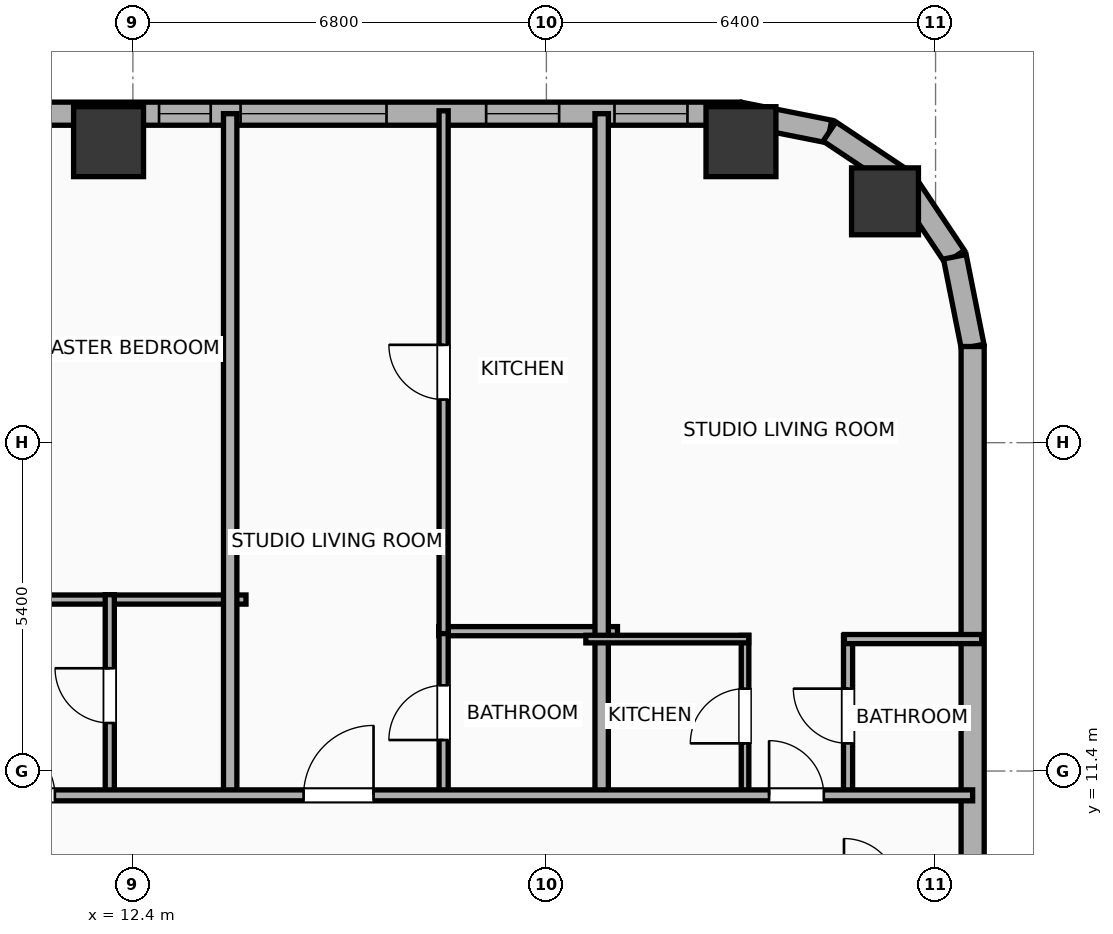
"""IFC4 building model, lengths in metres.
Left out: names, types, materials, properties, quantities, classifications, styles, units other than length and angle.
Written with IfcOpenShell. Run it as: python <this file> out.ifc"""

import sys

from ifc_helpers import new_model, si_unit, direction, frame, frame_2d, origin, origin_2d, place, context, subcontext, project, spatial, rectangle, hollow_rectangle, hollow_circle, extrude, element, fill, save


model = new_model("IFC4")
c1 = context("Model", 3, precision=1e-05, world=origin(), true_north=direction((0.0, 1.0)))
c2 = subcontext(c1, "Body", "Model", "MODEL_VIEW")
j1 = project(units=[si_unit("LENGTHUNIT", "METRE"), si_unit("PLANEANGLEUNIT", "RADIAN")], contexts=[c1])
p1 = place(None, origin())
s1 = spatial("IfcSite", under=j1, at=p1, CompositionType="ELEMENT")
p2 = place(p1, origin())
s2 = spatial("IfcBuilding", under=s1, at=p2, CompositionType="ELEMENT")
p3 = place(p2, frame((0.0, 0.0, 65.0)))
s3 = spatial("IfcBuildingStorey", under=s2, at=p3, CompositionType="ELEMENT", Elevation=65.0)
p4 = place(p3, frame((24.769, 20.769, 0.0), z_axis=(0.0, 0.0, 1.0), x_axis=(1.0, 0.0, 0.0)))
e1 = element("IfcColumn", 1, at=p4, inside=s3, PredefinedType="COLUMN", context=c2, shape_type="SweptSolid", body=[
    extrude(hollow_circle(Radius=0.55, WallThickness=0.036, at=origin_2d()), origin(), (0.0, 0.0, 1.0), 3.9),
])
for number, where, z_axis, x_axis in (
    (2, (22.4, 21.75, 0.0), (0.0, 0.0, 1.0), (1.0, 0.0, 0.0)),
    (3, (12.0, 21.75, 0.0), (0.0, 0.0, 1.0), (1.0, 0.0, 0.0)),
):
    element("IfcColumn", number, at=place(p3, frame(where, z_axis=z_axis, x_axis=x_axis)), inside=s3, PredefinedType="COLUMN", context=c2, shape_type="SweptSolid", body=[
        extrude(hollow_rectangle(XDim=1.15, YDim=1.15, WallThickness=0.04, at=origin_2d()), origin(), (0.0, 0.0, 1.0), 3.9),
    ])
p5 = place(p3, frame((-29.581, 22.21, 0.0), z_axis=(0.0, 0.0, 1.0), x_axis=(1.0, 0.0, 0.0)))
e4 = element("IfcWall", 4, at=p5, inside=s3, PredefinedType="ELEMENTEDWALL", context=c2, shape_type="SweptSolid", body=[
    extrude(rectangle(XDim=51.963, YDim=0.38, at=frame_2d((25.981, 0.0))), origin(), (0.0, 0.0, 1.0), 3.65),
])
p6 = place(p5, frame((5.81, 0.0, 0.75)))
e5 = element("IfcOpeningElement", 5, at=p6, cuts=e4, PredefinedType="OPENING", context=c2, shape_type="SweptSolid", body=[
    extrude(rectangle(XDim=2.4, YDim=2.1, at=frame_2d((1.2, 1.05))), frame((0.0, 0.2, 0.0), z_axis=(0.0, -1.0, 0.0), x_axis=(1.0, 0.0, 0.0)), (0.0, 0.0, 1.0), 0.4),
])
p7 = place(p5, frame((26.431, 0.0, 0.75)))
e6 = element("IfcOpeningElement", 6, at=p7, cuts=e4, PredefinedType="OPENING", context=c2, shape_type="SweptSolid", body=[
    extrude(rectangle(XDim=2.4, YDim=2.1, at=frame_2d((1.2, 1.05))), frame((0.0, 0.2, 0.0), z_axis=(0.0, -1.0, 0.0), x_axis=(1.0, 0.0, 0.0)), (0.0, 0.0, 1.0), 0.4),
])
p8 = place(p5, frame((43.752, 0.0, 0.75)))
e7 = element("IfcOpeningElement", 7, at=p8, cuts=e4, PredefinedType="OPENING", context=c2, shape_type="SweptSolid", body=[
    extrude(rectangle(XDim=2.4, YDim=2.1, at=frame_2d((1.2, 1.05))), frame((0.0, 0.2, 0.0), z_axis=(0.0, -1.0, 0.0), x_axis=(1.0, 0.0, 0.0)), (0.0, 0.0, 1.0), 0.4),
])
p9 = place(p5, frame((1.163, 0.0, 0.75)))
e8 = element("IfcOpeningElement", 8, at=p9, cuts=e4, PredefinedType="OPENING", context=c2, shape_type="SweptSolid", body=[
    extrude(rectangle(XDim=1.2, YDim=2.05, at=frame_2d((0.6, 1.025))), frame((0.0, 0.2, 0.0), z_axis=(0.0, -1.0, 0.0), x_axis=(1.0, 0.0, 0.0)), (0.0, 0.0, 1.0), 0.4),
])
p10 = place(p5, frame((3.251, 0.0, 0.75)))
e9 = element("IfcOpeningElement", 9, at=p10, cuts=e4, PredefinedType="OPENING", context=c2, shape_type="SweptSolid", body=[
    extrude(rectangle(XDim=1.2, YDim=2.05, at=frame_2d((0.6, 1.025))), frame((0.0, 0.2, 0.0), z_axis=(0.0, -1.0, 0.0), x_axis=(1.0, 0.0, 0.0)), (0.0, 0.0, 1.0), 0.4),
])
p11 = place(p5, frame((11.745, 0.0, 0.75)))
e10 = element("IfcOpeningElement", 10, at=p11, cuts=e4, PredefinedType="OPENING", context=c2, shape_type="SweptSolid", body=[
    extrude(rectangle(XDim=1.2, YDim=2.05, at=frame_2d((0.6, 1.025))), frame((0.0, 0.2, 0.0), z_axis=(0.0, -1.0, 0.0), x_axis=(1.0, 0.0, 0.0)), (0.0, 0.0, 1.0), 0.4),
])
p12 = place(p5, frame((16.776, 0.0, 0.75)))
e11 = element("IfcOpeningElement", 11, at=p12, cuts=e4, PredefinedType="OPENING", context=c2, shape_type="SweptSolid", body=[
    extrude(rectangle(XDim=1.2, YDim=2.05, at=frame_2d((0.6, 1.025))), frame((0.0, 0.2, 0.0), z_axis=(0.0, -1.0, 0.0), x_axis=(1.0, 0.0, 0.0)), (0.0, 0.0, 1.0), 0.4),
])
p13 = place(p5, frame((21.531, 0.0, 0.75)))
e12 = element("IfcOpeningElement", 12, at=p13, cuts=e4, PredefinedType="OPENING", context=c2, shape_type="SweptSolid", body=[
    extrude(rectangle(XDim=0.85, YDim=2.05, at=frame_2d((0.425, 1.025))), frame((0.0, 0.2, 0.0), z_axis=(0.0, -1.0, 0.0), x_axis=(1.0, 0.0, 0.0)), (0.0, 0.0, 1.0), 0.4),
])
p14 = place(p5, frame((23.776, 0.0, 0.75)))
e13 = element("IfcOpeningElement", 13, at=p14, cuts=e4, PredefinedType="OPENING", context=c2, shape_type="SweptSolid", body=[
    extrude(rectangle(XDim=1.2, YDim=2.05, at=frame_2d((0.6, 1.025))), frame((0.0, 0.2, 0.0), z_axis=(0.0, -1.0, 0.0), x_axis=(1.0, 0.0, 0.0)), (0.0, 0.0, 1.0), 0.4),
])
p15 = place(p5, frame((32.031, 0.0, 0.75)))
e14 = element("IfcOpeningElement", 14, at=p15, cuts=e4, PredefinedType="OPENING", context=c2, shape_type="SweptSolid", body=[
    extrude(rectangle(XDim=0.85, YDim=2.05, at=frame_2d((0.425, 1.025))), frame((0.0, 0.2, 0.0), z_axis=(0.0, -1.0, 0.0), x_axis=(1.0, 0.0, 0.0)), (0.0, 0.0, 1.0), 0.4),
])
p16 = place(p5, frame((34.276, 0.0, 0.75)))
e15 = element("IfcOpeningElement", 15, at=p16, cuts=e4, PredefinedType="OPENING", context=c2, shape_type="SweptSolid", body=[
    extrude(rectangle(XDim=1.2, YDim=2.05, at=frame_2d((0.6, 1.025))), frame((0.0, 0.2, 0.0), z_axis=(0.0, -1.0, 0.0), x_axis=(1.0, 0.0, 0.0)), (0.0, 0.0, 1.0), 0.4),
])
p17 = place(p5, frame((37.776, 0.0, 0.75)))
e16 = element("IfcOpeningElement", 16, at=p17, cuts=e4, PredefinedType="OPENING", context=c2, shape_type="SweptSolid", body=[
    extrude(rectangle(XDim=1.2, YDim=2.05, at=frame_2d((0.6, 1.025))), frame((0.0, 0.2, 0.0), z_axis=(0.0, -1.0, 0.0), x_axis=(1.0, 0.0, 0.0)), (0.0, 0.0, 1.0), 0.4),
])
p18 = place(p5, frame((42.411, 0.0, 0.75)))
e17 = element("IfcOpeningElement", 17, at=p18, cuts=e4, PredefinedType="OPENING", context=c2, shape_type="SweptSolid", body=[
    extrude(rectangle(XDim=0.85, YDim=2.05, at=frame_2d((0.425, 1.025))), frame((0.0, 0.2, 0.0), z_axis=(0.0, -1.0, 0.0), x_axis=(1.0, 0.0, 0.0)), (0.0, 0.0, 1.0), 0.4),
])
p19 = place(p5, frame((47.791, 0.0, 0.75)))
e18 = element("IfcOpeningElement", 18, at=p19, cuts=e4, PredefinedType="OPENING", context=c2, shape_type="SweptSolid", body=[
    extrude(rectangle(XDim=1.2, YDim=2.05, at=frame_2d((0.6, 1.025))), frame((0.0, 0.2, 0.0), z_axis=(0.0, -1.0, 0.0), x_axis=(1.0, 0.0, 0.0)), (0.0, 0.0, 1.0), 0.4),
])
p20 = place(p5, frame((49.901, 0.0, 0.75)))
e19 = element("IfcOpeningElement", 19, at=p20, cuts=e4, PredefinedType="OPENING", context=c2, shape_type="SweptSolid", body=[
    extrude(rectangle(XDim=1.2, YDim=2.05, at=frame_2d((0.6, 1.025))), frame((0.0, 0.2, 0.0), z_axis=(0.0, -1.0, 0.0), x_axis=(1.0, 0.0, 0.0)), (0.0, 0.0, 1.0), 0.4),
])
p21 = place(p3, frame((22.381, 22.21, 0.0), z_axis=(0.0, 0.0, 1.0), x_axis=(0.980786132421, -0.195086038585, 0.0)))
e20 = element("IfcWall", 20, at=p21, inside=s3, PredefinedType="ELEMENTEDWALL", context=c2, shape_type="SweptSolid", body=[
    extrude(rectangle(XDim=1.504, YDim=0.38, at=frame_2d((0.752, 0.0))), origin(), (0.0, 0.0, 1.0), 3.65),
])
for number, where, z_axis, x_axis in (
    (21, (23.857, 21.917, 0.0), (0.0, 0.0, 1.0), (0.831, -0.556, 0.0)),
    (22, (25.091, 21.091, 0.0), (0.0, 0.0, 1.0), (0.556, -0.831, 0.0)),
):
    element("IfcWall", number, at=place(p3, frame(where, z_axis=z_axis, x_axis=x_axis)), inside=s3, PredefinedType="ELEMENTEDWALL", context=c2, shape_type="SweptSolid", body=[
        extrude(rectangle(XDim=1.485, YDim=0.38, at=frame_2d((0.743, 0.0))), origin(), (0.0, 0.0, 1.0), 3.65),
    ])
p22 = place(p3, frame((25.917, 19.857, 0.0), z_axis=(0.0, 0.0, 1.0), x_axis=(0.195086038585, -0.980786132421, 0.0)))
e23 = element("IfcWall", 23, at=p22, inside=s3, PredefinedType="ELEMENTEDWALL", context=c2, shape_type="SweptSolid", body=[
    extrude(rectangle(XDim=1.504, YDim=0.38, at=frame_2d((0.752, 0.0))), origin(), (0.0, 0.0, 1.0), 3.65),
])
p23 = place(p3, frame((26.21, 18.381, 0.0), z_axis=(0.0, 0.0, 1.0), x_axis=(0.0, -1.0, 0.0)))
e24 = element("IfcWall", 24, at=p23, inside=s3, PredefinedType="ELEMENTEDWALL", context=c2, shape_type="SweptSolid", body=[
    extrude(rectangle(XDim=36.763, YDim=0.38, at=frame_2d((18.381, 0.0))), origin(), (0.0, 0.0, 1.0), 3.65),
])
p24 = place(p3, frame((10.47, 14.22, 0.0), z_axis=(0.0, 0.0, 1.0), x_axis=(1.0, 0.0, 0.0)))
e25 = element("IfcWall", 25, at=p24, inside=s3, PredefinedType="PLUMBINGWALL", context=c2, shape_type="SweptSolid", body=[
    extrude(rectangle(XDim=3.79, YDim=0.15, at=frame_2d((1.895, 0.0))), origin(), (0.0, 0.0, 1.0), 3.65),
])
p25 = place(p3, frame((12.02, 10.98, 0.0), z_axis=(0.0, 0.0, 1.0), x_axis=(0.0, 1.0, 0.0)))
e26 = element("IfcWall", 26, at=p25, inside=s3, PredefinedType="PLUMBINGWALL", context=c2, shape_type="SweptSolid", body=[
    extrude(rectangle(XDim=3.32, YDim=0.15, at=frame_2d((1.66, 0.0))), origin(), (0.0, 0.0, 1.0), 2.94),
])
p26 = place(p25, frame((1.21, 0.0, 0.0)))
e27 = element("IfcOpeningElement", 27, at=p26, cuts=e26, PredefinedType="OPENING", context=c2, shape_type="SweptSolid", body=[
    extrude(rectangle(XDim=0.9, YDim=2.05, at=frame_2d((0.45, 1.025))), frame((0.0, 0.085, 0.0), z_axis=(0.0, -1.0, 0.0), x_axis=(1.0, 0.0, 0.0)), (0.0, 0.0, 1.0), 0.17),
])
p27 = place(p3, frame((14.0, 10.92, 0.0), z_axis=(0.0, 0.0, 1.0), x_axis=(0.0, 1.0, 0.0)))
e28 = element("IfcWall", 28, at=p27, inside=s3, PredefinedType="PARTITIONING", context=c2, shape_type="SweptSolid", body=[
    extrude(rectangle(XDim=11.29, YDim=0.22, at=frame_2d((5.645, 0.0))), origin(), (0.0, 0.0, 1.0), 3.65),
])
p28 = place(p3, frame((17.43, 13.7, 0.0), z_axis=(0.0, 0.0, 1.0), x_axis=(1.0, 0.0, 0.0)))
e29 = element("IfcWall", 29, at=p28, inside=s3, PredefinedType="PLUMBINGWALL", context=c2, shape_type="SweptSolid", body=[
    extrude(rectangle(XDim=2.939, YDim=0.15, at=frame_2d((1.469, 0.0))), origin(), (0.0, 0.0, 1.0), 3.65),
])
p29 = place(p3, frame((17.51, 10.98, 0.0), z_axis=(0.0, 0.0, 1.0), x_axis=(0.0, 1.0, 0.0)))
e30 = element("IfcWall", 30, at=p29, inside=s3, PredefinedType="PLUMBINGWALL", context=c2, shape_type="SweptSolid", body=[
    extrude(rectangle(XDim=2.76, YDim=0.15, at=frame_2d((1.38, 0.0))), origin(), (0.0, 0.0, 1.0), 3.65),
])
p30 = place(p29, frame((0.93, 0.0, 0.0)))
e31 = element("IfcOpeningElement", 31, at=p30, cuts=e30, PredefinedType="OPENING", context=c2, shape_type="SweptSolid", body=[
    extrude(rectangle(XDim=0.9, YDim=2.05, at=frame_2d((0.45, 1.025))), frame((0.0, 0.085, 0.0), z_axis=(0.0, -1.0, 0.0), x_axis=(1.0, 0.0, 0.0)), (0.0, 0.0, 1.0), 0.17),
])
p31 = place(p3, frame((17.51, 13.66, 0.0), z_axis=(0.0, 0.0, 1.0), x_axis=(0.0, 1.0, 0.0)))
e32 = element("IfcWall", 32, at=p31, inside=s3, PredefinedType="PLUMBINGWALL", context=c2, shape_type="SweptSolid", body=[
    extrude(rectangle(XDim=8.598, YDim=0.15, at=frame_2d((4.299, 0.0))), origin(), (0.0, 0.0, 1.0), 3.65),
])
p32 = place(p31, frame((3.849, 0.0, 0.0)))
e33 = element("IfcOpeningElement", 33, at=p32, cuts=e32, PredefinedType="OPENING", context=c2, shape_type="SweptSolid", body=[
    extrude(rectangle(XDim=0.9, YDim=2.05, at=frame_2d((0.45, 1.025))), frame((0.0, 0.085, 0.0), z_axis=(0.0, -1.0, 0.0), x_axis=(1.0, 0.0, 0.0)), (0.0, 0.0, 1.0), 0.17),
])
p33 = place(p3, frame((20.109, 10.92, 0.0), z_axis=(0.0, 0.0, 1.0), x_axis=(0.0, 1.0, 0.0)))
e34 = element("IfcWall", 34, at=p33, inside=s3, PredefinedType="PARTITIONING", context=c2, shape_type="SweptSolid", body=[
    extrude(rectangle(XDim=11.29, YDim=0.22, at=frame_2d((5.645, 0.0))), origin(), (0.0, 0.0, 1.0), 3.65),
])
p34 = place(p3, frame((22.467, 10.98, 0.0), z_axis=(0.0, 0.0, 1.0), x_axis=(0.0, 1.0, 0.0)))
e35 = element("IfcWall", 35, at=p34, inside=s3, PredefinedType="PARTITIONING", context=c2, shape_type="SweptSolid", body=[
    extrude(rectangle(XDim=2.65, YDim=0.125, at=frame_2d((1.325, 0.0))), origin(), (0.0, 0.0, 1.0), 3.65),
])
p35 = place(p34, frame((0.875, 0.0, 0.0)))
e36 = element("IfcOpeningElement", 36, at=p35, cuts=e35, PredefinedType="OPENING", context=c2, shape_type="SweptSolid", body=[
    extrude(rectangle(XDim=0.9, YDim=2.05, at=frame_2d((0.45, 1.025))), frame((0.0, 0.073, 0.0), z_axis=(0.0, -1.0, 0.0), x_axis=(1.0, 0.0, 0.0)), (0.0, 0.0, 1.0), 0.145),
])
p36 = place(p3, frame((24.161, 10.98, 0.0), z_axis=(0.0, 0.0, 1.0), x_axis=(0.0, 1.0, 0.0)))
e37 = element("IfcWall", 37, at=p36, inside=s3, PredefinedType="PLUMBINGWALL", context=c2, shape_type="SweptSolid", body=[
    extrude(rectangle(XDim=2.65, YDim=0.15, at=frame_2d((1.325, 0.0))), origin(), (0.0, 0.0, 1.0), 3.65),
])
p37 = place(p36, frame((0.875, 0.0, 0.0)))
e38 = element("IfcOpeningElement", 38, at=p37, cuts=e37, PredefinedType="OPENING", context=c2, shape_type="SweptSolid", body=[
    extrude(rectangle(XDim=0.9, YDim=2.05, at=frame_2d((0.45, 1.025))), frame((0.0, 0.085, 0.0), z_axis=(0.0, -1.0, 0.0), x_axis=(1.0, 0.0, 0.0)), (0.0, 0.0, 1.0), 0.17),
])
p38 = place(p3, frame((19.849, 13.57, 0.0), z_axis=(0.0, 0.0, 1.0), x_axis=(1.0, 0.0, 0.0)))
e39 = element("IfcWall", 39, at=p38, inside=s3, PredefinedType="PARTITIONING", context=c2, shape_type="SweptSolid", body=[
    extrude(rectangle(XDim=2.678, YDim=0.125, at=frame_2d((1.339, 0.0))), origin(), (0.0, 0.0, 1.0), 3.65),
])
p39 = place(p3, frame((24.101, 13.57, 0.0), z_axis=(0.0, 0.0, 1.0), x_axis=(1.0, 0.0, 0.0)))
e40 = element("IfcWall", 40, at=p39, inside=s3, PredefinedType="PLUMBINGWALL", context=c2, shape_type="SweptSolid", body=[
    extrude(rectangle(XDim=2.259, YDim=0.15, at=frame_2d((1.129, 0.0))), origin(), (0.0, 0.0, 1.0), 3.65),
])
p40 = place(p3, frame((-33.41, 11.0, 0.0), z_axis=(0.0, 0.0, 1.0), x_axis=(1.0, 0.0, 0.0)))
e41 = element("IfcWall", 41, at=p40, inside=s3, PredefinedType="PARTITIONING", context=c2, shape_type="SweptSolid", body=[
    extrude(rectangle(XDim=59.62, YDim=0.18, at=frame_2d((29.81, 0.0))), origin(), (0.0, 0.0, 1.0), 3.65),
])
p41 = place(p40, frame((2.913, 0.0, 0.0)))
e42 = element("IfcOpeningElement", 42, at=p41, cuts=e41, PredefinedType="OPENING", context=c2, shape_type="SweptSolid", body=[
    extrude(rectangle(XDim=0.9, YDim=2.05, at=frame_2d((0.45, 1.025))), frame((0.0, 0.1, 0.0), z_axis=(0.0, -1.0, 0.0), x_axis=(1.0, 0.0, 0.0)), (0.0, 0.0, 1.0), 0.2),
])
p42 = place(p40, frame((10.312, 0.0, 0.0)))
e43 = element("IfcOpeningElement", 43, at=p42, cuts=e41, PredefinedType="OPENING", context=c2, shape_type="SweptSolid", body=[
    extrude(rectangle(XDim=1.15, YDim=2.05, at=frame_2d((0.575, 1.025))), frame((0.0, 0.1, 0.0), z_axis=(0.0, -1.0, 0.0), x_axis=(1.0, 0.0, 0.0)), (0.0, 0.0, 1.0), 0.2),
])
p43 = place(p40, frame((15.85, 0.0, 0.0)))
e44 = element("IfcOpeningElement", 44, at=p43, cuts=e41, PredefinedType="OPENING", context=c2, shape_type="SweptSolid", body=[
    extrude(rectangle(XDim=0.9, YDim=2.05, at=frame_2d((0.45, 1.025))), frame((0.0, 0.1, 0.0), z_axis=(0.0, -1.0, 0.0), x_axis=(1.0, 0.0, 0.0)), (0.0, 0.0, 1.0), 0.2),
])
p44 = place(p40, frame((22.623, 0.0, 0.0)))
e45 = element("IfcOpeningElement", 45, at=p44, cuts=e41, PredefinedType="OPENING", context=c2, shape_type="SweptSolid", body=[
    extrude(rectangle(XDim=0.9, YDim=2.05, at=frame_2d((0.45, 1.025))), frame((0.0, 0.1, 0.0), z_axis=(0.0, -1.0, 0.0), x_axis=(1.0, 0.0, 0.0)), (0.0, 0.0, 1.0), 0.2),
])
p45 = place(p40, frame((29.622, 0.0, 0.0)))
e46 = element("IfcOpeningElement", 46, at=p45, cuts=e41, PredefinedType="OPENING", context=c2, shape_type="SweptSolid", body=[
    extrude(rectangle(XDim=0.9, YDim=2.05, at=frame_2d((0.45, 1.025))), frame((0.0, 0.1, 0.0), z_axis=(0.0, -1.0, 0.0), x_axis=(1.0, 0.0, 0.0)), (0.0, 0.0, 1.0), 0.2),
])
p46 = place(p40, frame((36.628, 0.0, 0.0)))
e47 = element("IfcOpeningElement", 47, at=p46, cuts=e41, PredefinedType="OPENING", context=c2, shape_type="SweptSolid", body=[
    extrude(rectangle(XDim=0.9, YDim=2.05, at=frame_2d((0.45, 1.025))), frame((0.0, 0.1, 0.0), z_axis=(0.0, -1.0, 0.0), x_axis=(1.0, 0.0, 0.0)), (0.0, 0.0, 1.0), 0.2),
])
p47 = place(p40, frame((43.627, 0.0, 0.0)))
e48 = element("IfcOpeningElement", 48, at=p47, cuts=e41, PredefinedType="OPENING", context=c2, shape_type="SweptSolid", body=[
    extrude(rectangle(XDim=0.9, YDim=2.05, at=frame_2d((0.45, 1.025))), frame((0.0, 0.1, 0.0), z_axis=(0.0, -1.0, 0.0), x_axis=(1.0, 0.0, 0.0)), (0.0, 0.0, 1.0), 0.2),
])
p48 = place(p40, frame((48.617, 0.0, 0.0)))
e49 = element("IfcOpeningElement", 49, at=p48, cuts=e41, PredefinedType="OPENING", context=c2, shape_type="SweptSolid", body=[
    extrude(rectangle(XDim=1.15, YDim=2.05, at=frame_2d((0.575, 1.025))), frame((0.0, 0.1, 0.0), z_axis=(0.0, -1.0, 0.0), x_axis=(1.0, 0.0, 0.0)), (0.0, 0.0, 1.0), 0.2),
])
p49 = place(p40, frame((56.272, 0.0, 0.0)))
e50 = element("IfcOpeningElement", 50, at=p49, cuts=e41, PredefinedType="OPENING", context=c2, shape_type="SweptSolid", body=[
    extrude(rectangle(XDim=0.9, YDim=2.05, at=frame_2d((0.45, 1.025))), frame((0.0, 0.1, 0.0), z_axis=(0.0, -1.0, 0.0), x_axis=(1.0, 0.0, 0.0)), (0.0, 0.0, 1.0), 0.2),
])
p50 = place(p8, origin())
e51 = element("IfcWindow", 51, at=p50, inside=s3, PartitioningType="SINGLE_PANEL", PredefinedType="WINDOW", context=c2, shape_type="SweptSolid", body=[
    extrude(rectangle(XDim=2.4, YDim=2.1, at=frame_2d((1.2, 1.05))), frame((0.0, 0.03, 0.0), z_axis=(0.0, -1.0, 0.0), x_axis=(1.0, 0.0, 0.0)), (0.0, 0.0, 1.0), 0.06),
])
fill(e7, e51)
p51 = place(p18, origin())
e52 = element("IfcWindow", 52, at=p51, inside=s3, PartitioningType="SINGLE_PANEL", PredefinedType="WINDOW", context=c2, shape_type="SweptSolid", body=[
    extrude(rectangle(XDim=0.85, YDim=2.05, at=frame_2d((0.425, 1.025))), frame((0.0, 0.03, 0.0), z_axis=(0.0, -1.0, 0.0), x_axis=(1.0, 0.0, 0.0)), (0.0, 0.0, 1.0), 0.06),
])
fill(e17, e52)
p52 = place(p19, origin())
e53 = element("IfcWindow", 53, at=p52, inside=s3, PartitioningType="SINGLE_PANEL", PredefinedType="WINDOW", context=c2, shape_type="SweptSolid", body=[
    extrude(rectangle(XDim=1.2, YDim=2.05, at=frame_2d((0.6, 1.025))), frame((0.0, 0.03, 0.0), z_axis=(0.0, -1.0, 0.0), x_axis=(1.0, 0.0, 0.0)), (0.0, 0.0, 1.0), 0.06),
])
fill(e18, e53)
p53 = place(p20, origin())
e54 = element("IfcWindow", 54, at=p53, inside=s3, PartitioningType="SINGLE_PANEL", PredefinedType="WINDOW", context=c2, shape_type="SweptSolid", body=[
    extrude(rectangle(XDim=1.2, YDim=2.05, at=frame_2d((0.6, 1.025))), frame((0.0, 0.03, 0.0), z_axis=(0.0, -1.0, 0.0), x_axis=(1.0, 0.0, 0.0)), (0.0, 0.0, 1.0), 0.06),
])
fill(e19, e54)
p54 = place(p26, origin())
e55 = element("IfcDoor", 55, at=p54, inside=s3, OperationType="SINGLE_SWING_RIGHT", PredefinedType="DOOR", context=c2, shape_type="SweptSolid", body=[
    extrude(rectangle(XDim=0.9, YDim=2.05, at=frame_2d((0.45, 1.025))), frame((0.0, 0.025, 0.0), z_axis=(0.0, -1.0, 0.0), x_axis=(1.0, 0.0, 0.0)), (0.0, 0.0, 1.0), 0.05),
])
fill(e27, e55)
p55 = place(p30, origin())
e56 = element("IfcDoor", 56, at=p55, inside=s3, OperationType="SINGLE_SWING_LEFT", PredefinedType="DOOR", context=c2, shape_type="SweptSolid", body=[
    extrude(rectangle(XDim=0.9, YDim=2.05, at=frame_2d((0.45, 1.025))), frame((0.0, 0.025, 0.0), z_axis=(0.0, -1.0, 0.0), x_axis=(1.0, 0.0, 0.0)), (0.0, 0.0, 1.0), 0.05),
])
fill(e31, e56)
p56 = place(p32, origin())
e57 = element("IfcDoor", 57, at=p56, inside=s3, OperationType="SINGLE_SWING_RIGHT", PredefinedType="DOOR", context=c2, shape_type="SweptSolid", body=[
    extrude(rectangle(XDim=0.9, YDim=2.05, at=frame_2d((0.45, 1.025))), frame((0.0, 0.025, 0.0), z_axis=(0.0, -1.0, 0.0), x_axis=(1.0, 0.0, 0.0)), (0.0, 0.0, 1.0), 0.05),
])
fill(e33, e57)
p57 = place(p35, origin())
e58 = element("IfcDoor", 58, at=p57, inside=s3, OperationType="SINGLE_SWING_LEFT", PredefinedType="DOOR", context=c2, shape_type="SweptSolid", body=[
    extrude(rectangle(XDim=0.9, YDim=2.05, at=frame_2d((0.45, 1.025))), frame((0.0, 0.025, 0.0), z_axis=(0.0, -1.0, 0.0), x_axis=(1.0, 0.0, 0.0)), (0.0, 0.0, 1.0), 0.05),
])
fill(e36, e58)
p58 = place(p37, origin())
e59 = element("IfcDoor", 59, at=p58, inside=s3, OperationType="SINGLE_SWING_RIGHT", PredefinedType="DOOR", context=c2, shape_type="SweptSolid", body=[
    extrude(rectangle(XDim=0.9, YDim=2.05, at=frame_2d((0.45, 1.025))), frame((0.0, 0.025, 0.0), z_axis=(0.0, -1.0, 0.0), x_axis=(1.0, 0.0, 0.0)), (0.0, 0.0, 1.0), 0.05),
])
fill(e38, e59)
p59 = place(p47, origin())
e60 = element("IfcDoor", 60, at=p59, inside=s3, OperationType="SINGLE_SWING_LEFT", PredefinedType="DOOR", context=c2, shape_type="SweptSolid", body=[
    extrude(rectangle(XDim=0.9, YDim=2.05, at=frame_2d((0.45, 1.025))), frame((0.0, 0.025, 0.0), z_axis=(0.0, -1.0, 0.0), x_axis=(1.0, 0.0, 0.0)), (0.0, 0.0, 1.0), 0.05),
])
fill(e48, e60)
p60 = place(p48, origin())
e61 = element("IfcDoor", 61, at=p60, inside=s3, OperationType="SINGLE_SWING_RIGHT", PredefinedType="DOOR", context=c2, shape_type="SweptSolid", body=[
    extrude(rectangle(XDim=1.15, YDim=2.05, at=frame_2d((0.575, 1.025))), frame((0.0, 0.025, 0.0), z_axis=(0.0, -1.0, 0.0), x_axis=(1.0, 0.0, 0.0)), (0.0, 0.0, 1.0), 0.05),
])
fill(e49, e61)
p61 = place(p49, origin())
e62 = element("IfcDoor", 62, at=p61, inside=s3, OperationType="SINGLE_SWING_LEFT", PredefinedType="DOOR", context=c2, shape_type="SweptSolid", body=[
    extrude(rectangle(XDim=0.9, YDim=2.05, at=frame_2d((0.45, 1.025))), frame((0.0, 0.025, 0.0), z_axis=(0.0, -1.0, 0.0), x_axis=(1.0, 0.0, 0.0)), (0.0, 0.0, 1.0), 0.05),
])
fill(e50, e62)
save(model, sys.argv[1])
